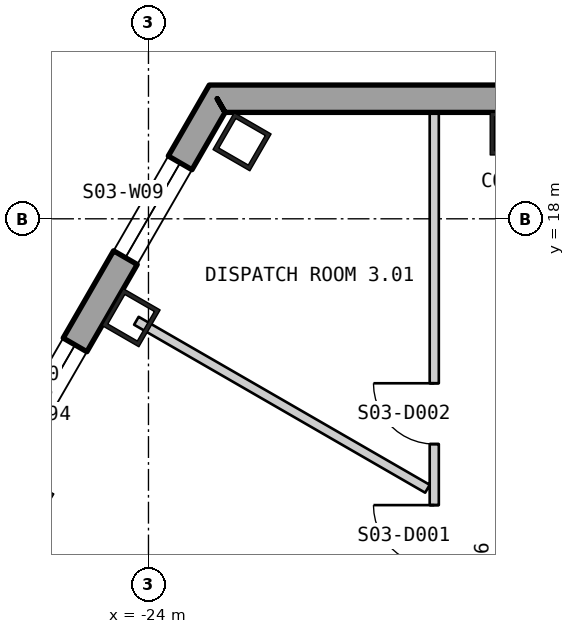
"""IFC4 building model, lengths in metres.
Left out: names, types, materials, properties, quantities, classifications, styles, units other than length and angle.
Written with IfcOpenShell. Run it as: python <this file> out.ifc"""

import sys

from ifc_helpers import new_model, si_unit, direction, frame, frame_2d, origin, origin_2d, place, context, subcontext, project, spatial, polyline, rectangle, hollow_rectangle, outline, extrude, element, fill, save


model = new_model("IFC4")
c1 = context("Model", 3, precision=1e-05, world=origin(), true_north=direction((0.0, 1.0)))
c2 = subcontext(c1, "Body", "Model", "MODEL_VIEW")
j1 = project(units=[si_unit("LENGTHUNIT", "METRE"), si_unit("PLANEANGLEUNIT", "RADIAN")], contexts=[c1])
p1 = place(None, origin())
s1 = spatial("IfcSite", under=j1, at=p1, CompositionType="ELEMENT")
p2 = place(p1, origin())
s2 = spatial("IfcBuilding", under=s1, at=p2, CompositionType="ELEMENT")
p3 = place(p2, frame((0.0, 0.0, 46.8)))
s3 = spatial("IfcBuildingStorey", under=s2, at=p3, CompositionType="ELEMENT", Elevation=46.8)
for number, where, z_axis, x_axis in (
    (1, (-18.03, 19.4, 0.0), (0.0, 0.0, 1.0), (-1.0, 0.0, 0.0)),
    (2, (-22.461, 19.267, 0.0), (0.0, 0.0, 1.0), (-0.5, -0.866, 0.0)),
    (3, (-24.286, 16.373, 0.0), (0.0, 0.0, 1.0), (-0.5, -0.866, 0.0)),
    (4, (-26.034, 13.346, 0.0), (0.0, 0.0, 1.0), (-0.5, -0.866, 0.0)),
):
    element("IfcColumn", number, at=place(p3, frame(where, z_axis=z_axis, x_axis=x_axis)), inside=s3, PredefinedType="COLUMN", context=c2, shape_type="SweptSolid", body=[
        extrude(hollow_rectangle(XDim=0.7, YDim=0.7, WallThickness=0.07, at=origin_2d()), origin(), (0.0, 0.0, 1.0), 4.5),
    ])
p4 = place(p3, frame((22.87, 19.975, -0.4), z_axis=(0.0, 0.0, 1.0), x_axis=(-1.0, 0.0, 0.0)))
e5 = element("IfcWall", 5, at=p4, inside=s3, PredefinedType="SOLIDWALL", context=c2, shape_type="SweptSolid", body=[
    extrude(outline(polyline([(-0.13, -0.225), (45.87, -0.225), (45.61, 0.225), (0.13, 0.225), (-0.13, -0.225)])), origin(), (0.0, 0.0, 1.0), 4.5),
])
p5 = place(p4, frame((5.893, 0.0, 1.3)))
e6 = element("IfcOpeningElement", 6, at=p5, cuts=e5, PredefinedType="OPENING", context=c2, shape_type="SweptSolid", body=[
    extrude(rectangle(XDim=2.4, YDim=2.6, at=frame_2d((1.2, 1.3))), frame((0.0, 0.235, 0.0), z_axis=(0.0, -1.0, 0.0), x_axis=(1.0, 0.0, 0.0)), (0.0, 0.0, 1.0), 0.47),
])
p6 = place(p4, frame((10.401, 0.0, 1.3)))
e7 = element("IfcOpeningElement", 7, at=p6, cuts=e5, PredefinedType="OPENING", context=c2, shape_type="SweptSolid", body=[
    extrude(rectangle(XDim=2.4, YDim=2.6, at=frame_2d((1.2, 1.3))), frame((0.0, 0.235, 0.0), z_axis=(0.0, -1.0, 0.0), x_axis=(1.0, 0.0, 0.0)), (0.0, 0.0, 1.0), 0.47),
])
p7 = place(p4, frame((14.909, 0.0, 1.3)))
e8 = element("IfcOpeningElement", 8, at=p7, cuts=e5, PredefinedType="OPENING", context=c2, shape_type="SweptSolid", body=[
    extrude(rectangle(XDim=2.4, YDim=2.6, at=frame_2d((1.2, 1.3))), frame((0.0, 0.235, 0.0), z_axis=(0.0, -1.0, 0.0), x_axis=(1.0, 0.0, 0.0)), (0.0, 0.0, 1.0), 0.47),
])
p8 = place(p4, frame((19.416, 0.0, 1.3)))
e9 = element("IfcOpeningElement", 9, at=p8, cuts=e5, PredefinedType="OPENING", context=c2, shape_type="SweptSolid", body=[
    extrude(rectangle(XDim=2.4, YDim=2.6, at=frame_2d((1.2, 1.3))), frame((0.0, 0.235, 0.0), z_axis=(0.0, -1.0, 0.0), x_axis=(1.0, 0.0, 0.0)), (0.0, 0.0, 1.0), 0.47),
])
p9 = place(p4, frame((23.924, 0.0, 1.3)))
e10 = element("IfcOpeningElement", 10, at=p9, cuts=e5, PredefinedType="OPENING", context=c2, shape_type="SweptSolid", body=[
    extrude(rectangle(XDim=2.4, YDim=2.6, at=frame_2d((1.2, 1.3))), frame((0.0, 0.235, 0.0), z_axis=(0.0, -1.0, 0.0), x_axis=(1.0, 0.0, 0.0)), (0.0, 0.0, 1.0), 0.47),
])
p10 = place(p4, frame((28.431, 0.0, 1.3)))
e11 = element("IfcOpeningElement", 11, at=p10, cuts=e5, PredefinedType="OPENING", context=c2, shape_type="SweptSolid", body=[
    extrude(rectangle(XDim=2.4, YDim=2.6, at=frame_2d((1.2, 1.3))), frame((0.0, 0.235, 0.0), z_axis=(0.0, -1.0, 0.0), x_axis=(1.0, 0.0, 0.0)), (0.0, 0.0, 1.0), 0.47),
])
p11 = place(p4, frame((32.939, 0.0, 1.3)))
e12 = element("IfcOpeningElement", 12, at=p11, cuts=e5, PredefinedType="OPENING", context=c2, shape_type="SweptSolid", body=[
    extrude(rectangle(XDim=2.4, YDim=2.6, at=frame_2d((1.2, 1.3))), frame((0.0, 0.235, 0.0), z_axis=(0.0, -1.0, 0.0), x_axis=(1.0, 0.0, 0.0)), (0.0, 0.0, 1.0), 0.47),
])
p12 = place(p4, frame((37.447, 0.0, 1.3)))
e13 = element("IfcOpeningElement", 13, at=p12, cuts=e5, PredefinedType="OPENING", context=c2, shape_type="SweptSolid", body=[
    extrude(rectangle(XDim=2.4, YDim=2.6, at=frame_2d((1.2, 1.3))), frame((0.0, 0.235, 0.0), z_axis=(0.0, -1.0, 0.0), x_axis=(1.0, 0.0, 0.0)), (0.0, 0.0, 1.0), 0.47),
])
p13 = place(p3, frame((-22.87, 19.975, -0.4), z_axis=(0.0, 0.0, 1.0), x_axis=(-0.500002192499, -0.866024137941, 0.0)))
e14 = element("IfcWall", 14, at=p13, inside=s3, PredefinedType="SOLIDWALL", context=c2, shape_type="SweptSolid", body=[
    extrude(outline(polyline([(-0.13, -0.225), (11.28, -0.225), (11.02, 0.225), (0.13, 0.225), (-0.13, -0.225)])), origin(), (0.0, 0.0, 1.0), 4.5),
])
p14 = place(p13, frame((1.218, 0.0, 1.3)))
e15 = element("IfcOpeningElement", 15, at=p14, cuts=e14, PredefinedType="OPENING", context=c2, shape_type="SweptSolid", body=[
    extrude(rectangle(XDim=1.8, YDim=2.6, at=frame_2d((0.9, 1.3))), frame((0.0, 0.235, 0.0), z_axis=(0.0, -1.0, 0.0), x_axis=(1.0, 0.0, 0.0)), (0.0, 0.0, 1.0), 0.47),
])
p15 = place(p13, frame((4.675, 0.0, 1.3)))
e16 = element("IfcOpeningElement", 16, at=p15, cuts=e14, PredefinedType="OPENING", context=c2, shape_type="SweptSolid", body=[
    extrude(rectangle(XDim=1.8, YDim=2.6, at=frame_2d((0.9, 1.3))), frame((0.0, 0.235, 0.0), z_axis=(0.0, -1.0, 0.0), x_axis=(1.0, 0.0, 0.0)), (0.0, 0.0, 1.0), 0.47),
])
p16 = place(p13, frame((8.132, 0.0, 1.3)))
e17 = element("IfcOpeningElement", 17, at=p16, cuts=e14, PredefinedType="OPENING", context=c2, shape_type="SweptSolid", body=[
    extrude(rectangle(XDim=1.8, YDim=2.6, at=frame_2d((0.9, 1.3))), frame((0.0, 0.235, 0.0), z_axis=(0.0, -1.0, 0.0), x_axis=(1.0, 0.0, 0.0)), (0.0, 0.0, 1.0), 0.47),
])
p17 = place(p3, frame((-24.199, 16.323, 0.0), z_axis=(0.0, 0.0, 1.0), x_axis=(0.866086170813, -0.499894733645, 0.0)))
e18 = element("IfcWall", 18, at=p17, inside=s3, PredefinedType="PARTITIONING", context=c2, shape_type="SweptSolid", body=[
    extrude(rectangle(XDim=5.527, YDim=0.15, at=frame_2d((2.764, 0.0))), origin(), (0.0, 0.0, 1.0), 4.3),
])
p18 = place(p3, frame((-19.3, -1.875, 0.0), z_axis=(0.0, 0.0, 1.0), x_axis=(0.0, 1.0, 0.0)))
e19 = element("IfcWall", 19, at=p18, inside=s3, PredefinedType="PARTITIONING", context=c2, shape_type="SweptSolid", body=[
    extrude(rectangle(XDim=21.624, YDim=0.15, at=frame_2d((10.812, 0.0))), origin(), (0.0, 0.0, 1.0), 4.3),
])
p19 = place(p18, frame((14.166, 0.0, 0.0)))
e20 = element("IfcOpeningElement", 20, at=p19, cuts=e19, PredefinedType="OPENING", context=c2, shape_type="SweptSolid", body=[
    extrude(rectangle(XDim=1.0, YDim=2.1, at=frame_2d((0.5, 1.05))), frame((0.0, 0.085, 0.0), z_axis=(0.0, -1.0, 0.0), x_axis=(1.0, 0.0, 0.0)), (0.0, 0.0, 1.0), 0.17),
])
p20 = place(p18, frame((16.17, 0.0, 0.0)))
e21 = element("IfcOpeningElement", 21, at=p20, cuts=e19, PredefinedType="OPENING", context=c2, shape_type="SweptSolid", body=[
    extrude(rectangle(XDim=1.0, YDim=2.1, at=frame_2d((0.5, 1.05))), frame((0.0, 0.085, 0.0), z_axis=(0.0, -1.0, 0.0), x_axis=(1.0, 0.0, 0.0)), (0.0, 0.0, 1.0), 0.17),
])
p21 = place(p14, origin())
e22 = element("IfcWindow", 22, at=p21, inside=s3, PartitioningType="SINGLE_PANEL", PredefinedType="WINDOW", context=c2, shape_type="SweptSolid", body=[
    extrude(rectangle(XDim=1.8, YDim=2.6, at=frame_2d((0.9, 1.3))), frame((0.0, 0.105, 0.0), z_axis=(0.0, -1.0, 0.0), x_axis=(1.0, 0.0, 0.0)), (0.0, 0.0, 1.0), 0.06),
])
fill(e15, e22)
p22 = place(p15, origin())
e23 = element("IfcWindow", 23, at=p22, inside=s3, PartitioningType="SINGLE_PANEL", PredefinedType="WINDOW", context=c2, shape_type="SweptSolid", body=[
    extrude(rectangle(XDim=1.8, YDim=2.6, at=frame_2d((0.9, 1.3))), frame((0.0, 0.105, 0.0), z_axis=(0.0, -1.0, 0.0), x_axis=(1.0, 0.0, 0.0)), (0.0, 0.0, 1.0), 0.06),
])
fill(e16, e23)
p23 = place(p19, origin())
e24 = element("IfcDoor", 24, at=p23, inside=s3, OperationType="SINGLE_SWING_LEFT", PredefinedType="DOOR", context=c2, shape_type="SweptSolid", body=[
    extrude(rectangle(XDim=1.0, YDim=2.1, at=frame_2d((0.5, 1.05))), frame((0.0, 0.025, 0.0), z_axis=(0.0, -1.0, 0.0), x_axis=(1.0, 0.0, 0.0)), (0.0, 0.0, 1.0), 0.05),
])
fill(e20, e24)
p24 = place(p20, origin())
e25 = element("IfcDoor", 25, at=p24, inside=s3, OperationType="SINGLE_SWING_LEFT", PredefinedType="DOOR", context=c2, shape_type="SweptSolid", body=[
    extrude(rectangle(XDim=1.0, YDim=2.1, at=frame_2d((0.5, 1.05))), frame((0.0, 0.025, 0.0), z_axis=(0.0, -1.0, 0.0), x_axis=(1.0, 0.0, 0.0)), (0.0, 0.0, 1.0), 0.05),
])
fill(e21, e25)
save(model, sys.argv[1])
